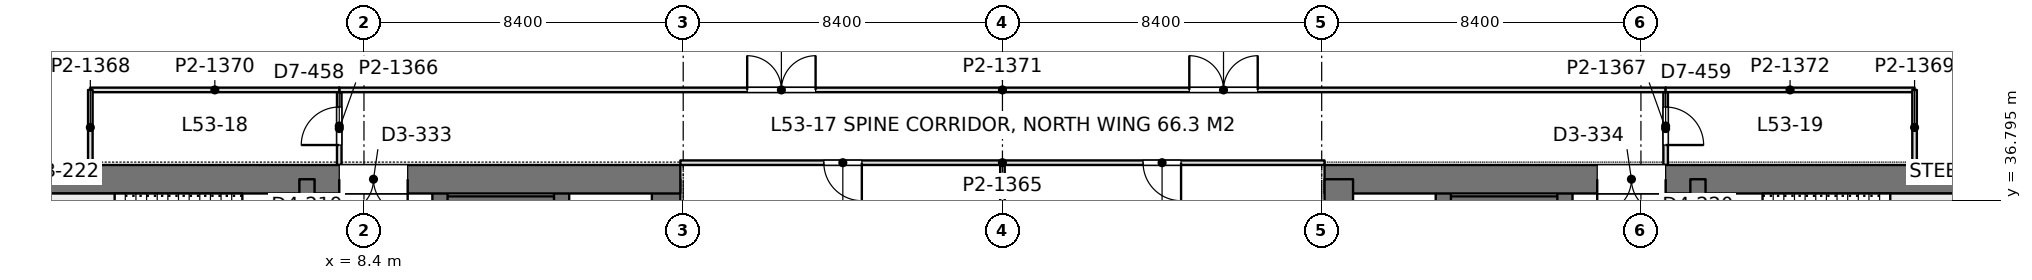
"""IFC4 building model, lengths in metres.
Left out: names, types, materials, properties, quantities, classifications, styles, units other than length and angle.
Written with IfcOpenShell. Run it as: python <this file> out.ifc"""

import sys

from ifc_helpers import new_model, si_unit, direction, frame, frame_2d, origin, place, context, subcontext, project, spatial, rectangle, extrude, element, fill, save


model = new_model("IFC4")
c1 = context("Model", 3, precision=1e-05, world=origin(), true_north=direction((0.0, 1.0)))
c2 = subcontext(c1, "Body", "Model", "MODEL_VIEW")
j1 = project(units=[si_unit("LENGTHUNIT", "METRE"), si_unit("PLANEANGLEUNIT", "RADIAN")], contexts=[c1])
p1 = place(None, origin())
s1 = spatial("IfcSite", under=j1, at=p1, CompositionType="ELEMENT")
p2 = place(p1, origin())
s2 = spatial("IfcBuilding", under=s1, at=p2, CompositionType="ELEMENT")
p3 = place(p2, frame((0.0, 0.0, 232.2)))
s3 = spatial("IfcBuildingStorey", under=s2, at=p3, CompositionType="ELEMENT", Elevation=232.2)
p4 = place(p3, frame((-1.125, 37.35, 0.0), z_axis=(0.0, 0.0, 1.0), x_axis=(1.0, 0.0, 0.0)))
e1 = element("IfcWall", 1, at=p4, inside=s3, PredefinedType="SHEAR", context=c2, shape_type="SweptSolid", body=[
    extrude(rectangle(XDim=17.85, YDim=0.75, at=frame_2d((8.925, 0.0))), origin(), (0.0, 0.0, 1.0), 4.2),
])
p5 = place(p4, frame((8.875, 0.0, 0.0)))
e2 = element("IfcOpeningElement", 2, at=p5, cuts=e1, PredefinedType="OPENING", context=c2, shape_type="SweptSolid", body=[
    extrude(rectangle(XDim=1.8, YDim=2.4, at=frame_2d((0.9, 1.2))), frame((0.0, 0.385, 0.0), z_axis=(0.0, -1.0, 0.0), x_axis=(1.0, 0.0, 0.0)), (0.0, 0.0, 1.0), 0.77),
])
p6 = place(p3, frame((16.35, 27.8, 0.0), z_axis=(0.0, 0.0, 1.0), x_axis=(0.0, 1.0, 0.0)))
e3 = element("IfcWall", 3, at=p6, inside=s3, PredefinedType="SHEAR", context=c2, shape_type="SweptSolid", body=[
    extrude(rectangle(XDim=9.55, YDim=0.75, at=frame_2d((4.775, 0.0))), origin(), (0.0, 0.0, 1.0), 4.2),
])
p7 = place(p3, frame((6.9, 13.05, 0.0), z_axis=(0.0, 0.0, 1.0), x_axis=(0.0, 1.0, 0.0)))
e4 = element("IfcWall", 4, at=p7, inside=s3, PredefinedType="SHEAR", context=c2, shape_type="SweptSolid", body=[
    extrude(rectangle(XDim=24.3, YDim=0.4, at=frame_2d((12.15, 0.0))), origin(), (0.0, 0.0, 1.0), 4.2),
])
p8 = place(p7, frame((1.3, 0.0, 0.0)))
e5 = element("IfcOpeningElement", 5, at=p8, cuts=e4, PredefinedType="OPENING", context=c2, shape_type="SweptSolid", body=[
    extrude(rectangle(XDim=1.0, YDim=2.2, at=frame_2d((0.5, 1.1))), frame((0.0, 0.21, 0.0), z_axis=(0.0, -1.0, 0.0), x_axis=(1.0, 0.0, 0.0)), (0.0, 0.0, 1.0), 0.42),
])
p9 = place(p7, frame((22.0, 0.0, 0.0)))
e6 = element("IfcOpeningElement", 6, at=p9, cuts=e4, PredefinedType="OPENING", context=c2, shape_type="SweptSolid", body=[
    extrude(rectangle(XDim=1.0, YDim=2.2, at=frame_2d((0.5, 1.1))), frame((0.0, 0.21, 0.0), z_axis=(0.0, -1.0, 0.0), x_axis=(1.0, 0.0, 0.0)), (0.0, 0.0, 1.0), 0.42),
])
p10 = place(p7, frame((5.55, 0.0, 0.0)))
e7 = element("IfcOpeningElement", 7, at=p10, cuts=e4, PredefinedType="OPENING", context=c2, shape_type="SweptSolid", body=[
    extrude(rectangle(XDim=1.0, YDim=2.2, at=frame_2d((0.5, 1.1))), frame((0.0, 0.21, 0.0), z_axis=(0.0, -1.0, 0.0), x_axis=(1.0, 0.0, 0.0)), (0.0, 0.0, 1.0), 0.42),
])
p11 = place(p7, frame((9.55, 0.0, 0.0)))
e8 = element("IfcOpeningElement", 8, at=p11, cuts=e4, PredefinedType="OPENING", context=c2, shape_type="SweptSolid", body=[
    extrude(rectangle(XDim=1.0, YDim=2.2, at=frame_2d((0.5, 1.1))), frame((0.0, 0.21, 0.0), z_axis=(0.0, -1.0, 0.0), x_axis=(1.0, 0.0, 0.0)), (0.0, 0.0, 1.0), 0.42),
])
p12 = place(p7, frame((12.8, 0.0, 0.0)))
e9 = element("IfcOpeningElement", 9, at=p12, cuts=e4, PredefinedType="OPENING", context=c2, shape_type="SweptSolid", body=[
    extrude(rectangle(XDim=1.1, YDim=2.2, at=frame_2d((0.55, 1.1))), frame((0.0, 0.21, 0.0), z_axis=(0.0, -1.0, 0.0), x_axis=(1.0, 0.0, 0.0)), (0.0, 0.0, 1.0), 0.42),
])
p13 = place(p7, frame((15.538, 0.0, 0.0)))
e10 = element("IfcOpeningElement", 10, at=p13, cuts=e4, PredefinedType="OPENING", context=c2, shape_type="SweptSolid", body=[
    extrude(rectangle(XDim=1.1, YDim=2.2, at=frame_2d((0.55, 1.1))), frame((0.0, 0.21, 0.0), z_axis=(0.0, -1.0, 0.0), x_axis=(1.0, 0.0, 0.0)), (0.0, 0.0, 1.0), 0.42),
])
p14 = place(p7, frame((18.262, 0.0, 0.0)))
e11 = element("IfcOpeningElement", 11, at=p14, cuts=e4, PredefinedType="OPENING", context=c2, shape_type="SweptSolid", body=[
    extrude(rectangle(XDim=1.1, YDim=2.2, at=frame_2d((0.55, 1.1))), frame((0.0, 0.21, 0.0), z_axis=(0.0, -1.0, 0.0), x_axis=(1.0, 0.0, 0.0)), (0.0, 0.0, 1.0), 0.42),
])
p15 = place(p3, frame((10.4, 13.05, 0.0), z_axis=(0.0, 0.0, 1.0), x_axis=(0.0, 1.0, 0.0)))
e12 = element("IfcWall", 12, at=p15, inside=s3, PredefinedType="SHEAR", context=c2, shape_type="SweptSolid", body=[
    extrude(rectangle(XDim=24.3, YDim=0.4, at=frame_2d((12.15, 0.0))), origin(), (0.0, 0.0, 1.0), 4.2),
])
p16 = place(p15, frame((15.75, 0.0, 0.0)))
e13 = element("IfcOpeningElement", 13, at=p16, cuts=e12, PredefinedType="OPENING", context=c2, shape_type="SweptSolid", body=[
    extrude(rectangle(XDim=1.1, YDim=2.2, at=frame_2d((0.55, 1.1))), frame((0.0, 0.21, 0.0), z_axis=(0.0, -1.0, 0.0), x_axis=(1.0, 0.0, 0.0)), (0.0, 0.0, 1.0), 0.42),
])
p17 = place(p15, frame((18.6, 0.0, 0.0)))
e14 = element("IfcOpeningElement", 14, at=p17, cuts=e12, PredefinedType="OPENING", context=c2, shape_type="SweptSolid", body=[
    extrude(rectangle(XDim=1.1, YDim=2.2, at=frame_2d((0.55, 1.1))), frame((0.0, 0.21, 0.0), z_axis=(0.0, -1.0, 0.0), x_axis=(1.0, 0.0, 0.0)), (0.0, 0.0, 1.0), 0.42),
])
p18 = place(p15, frame((21.45, 0.0, 0.0)))
e15 = element("IfcOpeningElement", 15, at=p18, cuts=e12, PredefinedType="OPENING", context=c2, shape_type="SweptSolid", body=[
    extrude(rectangle(XDim=1.1, YDim=2.2, at=frame_2d((0.55, 1.1))), frame((0.0, 0.21, 0.0), z_axis=(0.0, -1.0, 0.0), x_axis=(1.0, 0.0, 0.0)), (0.0, 0.0, 1.0), 0.42),
])
p19 = place(p15, frame((8.65, 0.0, 0.0)))
e16 = element("IfcOpeningElement", 16, at=p19, cuts=e12, PredefinedType="OPENING", context=c2, shape_type="SweptSolid", body=[
    extrude(rectangle(XDim=1.8, YDim=2.4, at=frame_2d((0.9, 1.2))), frame((0.0, 0.21, 0.0), z_axis=(0.0, -1.0, 0.0), x_axis=(1.0, 0.0, 0.0)), (0.0, 0.0, 1.0), 0.42),
])
p20 = place(p3, frame((13.6, 27.925, 0.0), z_axis=(0.0, 0.0, 1.0), x_axis=(0.0, 1.0, 0.0)))
e17 = element("IfcWall", 17, at=p20, inside=s3, PredefinedType="SHEAR", context=c2, shape_type="SweptSolid", body=[
    extrude(rectangle(XDim=9.425, YDim=0.4, at=frame_2d((4.712, 0.0))), origin(), (0.0, 0.0, 1.0), 4.2),
])
p21 = place(p3, frame((10.4, 36.625, 0.0), z_axis=(0.0, 0.0, 1.0), x_axis=(1.0, 0.0, 0.0)))
e18 = element("IfcWall", 18, at=p21, inside=s3, PredefinedType="SHEAR", context=c2, shape_type="SweptSolid", body=[
    extrude(rectangle(XDim=3.2, YDim=0.55, at=frame_2d((1.6, 0.0))), origin(), (0.0, 0.0, 1.0), 4.2),
])
p22 = place(p3, frame((33.675, 37.35, 0.0), z_axis=(0.0, 0.0, 1.0), x_axis=(1.0, 0.0, 0.0)))
e19 = element("IfcWall", 19, at=p22, inside=s3, PredefinedType="SHEAR", context=c2, shape_type="SweptSolid", body=[
    extrude(rectangle(XDim=17.85, YDim=0.75, at=frame_2d((8.925, 0.0))), origin(), (0.0, 0.0, 1.0), 4.2),
])
p23 = place(p22, frame((7.175, 0.0, 0.0)))
e20 = element("IfcOpeningElement", 20, at=p23, cuts=e19, PredefinedType="OPENING", context=c2, shape_type="SweptSolid", body=[
    extrude(rectangle(XDim=1.8, YDim=2.4, at=frame_2d((0.9, 1.2))), frame((0.0, 0.385, 0.0), z_axis=(0.0, -1.0, 0.0), x_axis=(1.0, 0.0, 0.0)), (0.0, 0.0, 1.0), 0.77),
])
p24 = place(p3, frame((34.05, 27.8, 0.0), z_axis=(0.0, 0.0, 1.0), x_axis=(0.0, 1.0, 0.0)))
e21 = element("IfcWall", 21, at=p24, inside=s3, PredefinedType="SHEAR", context=c2, shape_type="SweptSolid", body=[
    extrude(rectangle(XDim=9.55, YDim=0.75, at=frame_2d((4.775, 0.0))), origin(), (0.0, 0.0, 1.0), 4.2),
])
p25 = place(p3, frame((43.5, 13.05, 0.0), z_axis=(0.0, 0.0, 1.0), x_axis=(0.0, 1.0, 0.0)))
e22 = element("IfcWall", 22, at=p25, inside=s3, PredefinedType="SHEAR", context=c2, shape_type="SweptSolid", body=[
    extrude(rectangle(XDim=24.3, YDim=0.4, at=frame_2d((12.15, 0.0))), origin(), (0.0, 0.0, 1.0), 4.2),
])
p26 = place(p25, frame((1.3, 0.0, 0.0)))
e23 = element("IfcOpeningElement", 23, at=p26, cuts=e22, PredefinedType="OPENING", context=c2, shape_type="SweptSolid", body=[
    extrude(rectangle(XDim=1.0, YDim=2.2, at=frame_2d((0.5, 1.1))), frame((0.0, 0.21, 0.0), z_axis=(0.0, -1.0, 0.0), x_axis=(1.0, 0.0, 0.0)), (0.0, 0.0, 1.0), 0.42),
])
p27 = place(p25, frame((22.0, 0.0, 0.0)))
e24 = element("IfcOpeningElement", 24, at=p27, cuts=e22, PredefinedType="OPENING", context=c2, shape_type="SweptSolid", body=[
    extrude(rectangle(XDim=1.0, YDim=2.2, at=frame_2d((0.5, 1.1))), frame((0.0, 0.21, 0.0), z_axis=(0.0, -1.0, 0.0), x_axis=(1.0, 0.0, 0.0)), (0.0, 0.0, 1.0), 0.42),
])
p28 = place(p25, frame((5.55, 0.0, 0.0)))
e25 = element("IfcOpeningElement", 25, at=p28, cuts=e22, PredefinedType="OPENING", context=c2, shape_type="SweptSolid", body=[
    extrude(rectangle(XDim=1.0, YDim=2.2, at=frame_2d((0.5, 1.1))), frame((0.0, 0.21, 0.0), z_axis=(0.0, -1.0, 0.0), x_axis=(1.0, 0.0, 0.0)), (0.0, 0.0, 1.0), 0.42),
])
p29 = place(p25, frame((9.55, 0.0, 0.0)))
e26 = element("IfcOpeningElement", 26, at=p29, cuts=e22, PredefinedType="OPENING", context=c2, shape_type="SweptSolid", body=[
    extrude(rectangle(XDim=1.0, YDim=2.2, at=frame_2d((0.5, 1.1))), frame((0.0, 0.21, 0.0), z_axis=(0.0, -1.0, 0.0), x_axis=(1.0, 0.0, 0.0)), (0.0, 0.0, 1.0), 0.42),
])
p30 = place(p25, frame((12.8, 0.0, 0.0)))
e27 = element("IfcOpeningElement", 27, at=p30, cuts=e22, PredefinedType="OPENING", context=c2, shape_type="SweptSolid", body=[
    extrude(rectangle(XDim=1.1, YDim=2.2, at=frame_2d((0.55, 1.1))), frame((0.0, 0.21, 0.0), z_axis=(0.0, -1.0, 0.0), x_axis=(1.0, 0.0, 0.0)), (0.0, 0.0, 1.0), 0.42),
])
p31 = place(p25, frame((15.538, 0.0, 0.0)))
e28 = element("IfcOpeningElement", 28, at=p31, cuts=e22, PredefinedType="OPENING", context=c2, shape_type="SweptSolid", body=[
    extrude(rectangle(XDim=1.1, YDim=2.2, at=frame_2d((0.55, 1.1))), frame((0.0, 0.21, 0.0), z_axis=(0.0, -1.0, 0.0), x_axis=(1.0, 0.0, 0.0)), (0.0, 0.0, 1.0), 0.42),
])
p32 = place(p25, frame((18.262, 0.0, 0.0)))
e29 = element("IfcOpeningElement", 29, at=p32, cuts=e22, PredefinedType="OPENING", context=c2, shape_type="SweptSolid", body=[
    extrude(rectangle(XDim=1.1, YDim=2.2, at=frame_2d((0.55, 1.1))), frame((0.0, 0.21, 0.0), z_axis=(0.0, -1.0, 0.0), x_axis=(1.0, 0.0, 0.0)), (0.0, 0.0, 1.0), 0.42),
])
p33 = place(p3, frame((40.0, 13.05, 0.0), z_axis=(0.0, 0.0, 1.0), x_axis=(0.0, 1.0, 0.0)))
e30 = element("IfcWall", 30, at=p33, inside=s3, PredefinedType="SHEAR", context=c2, shape_type="SweptSolid", body=[
    extrude(rectangle(XDim=24.3, YDim=0.4, at=frame_2d((12.15, 0.0))), origin(), (0.0, 0.0, 1.0), 4.2),
])
p34 = place(p33, frame((15.75, 0.0, 0.0)))
e31 = element("IfcOpeningElement", 31, at=p34, cuts=e30, PredefinedType="OPENING", context=c2, shape_type="SweptSolid", body=[
    extrude(rectangle(XDim=1.1, YDim=2.2, at=frame_2d((0.55, 1.1))), frame((0.0, 0.21, 0.0), z_axis=(0.0, -1.0, 0.0), x_axis=(1.0, 0.0, 0.0)), (0.0, 0.0, 1.0), 0.42),
])
p35 = place(p33, frame((18.6, 0.0, 0.0)))
e32 = element("IfcOpeningElement", 32, at=p35, cuts=e30, PredefinedType="OPENING", context=c2, shape_type="SweptSolid", body=[
    extrude(rectangle(XDim=1.1, YDim=2.2, at=frame_2d((0.55, 1.1))), frame((0.0, 0.21, 0.0), z_axis=(0.0, -1.0, 0.0), x_axis=(1.0, 0.0, 0.0)), (0.0, 0.0, 1.0), 0.42),
])
p36 = place(p33, frame((21.45, 0.0, 0.0)))
e33 = element("IfcOpeningElement", 33, at=p36, cuts=e30, PredefinedType="OPENING", context=c2, shape_type="SweptSolid", body=[
    extrude(rectangle(XDim=1.1, YDim=2.2, at=frame_2d((0.55, 1.1))), frame((0.0, 0.21, 0.0), z_axis=(0.0, -1.0, 0.0), x_axis=(1.0, 0.0, 0.0)), (0.0, 0.0, 1.0), 0.42),
])
p37 = place(p33, frame((8.65, 0.0, 0.0)))
e34 = element("IfcOpeningElement", 34, at=p37, cuts=e30, PredefinedType="OPENING", context=c2, shape_type="SweptSolid", body=[
    extrude(rectangle(XDim=1.8, YDim=2.4, at=frame_2d((0.9, 1.2))), frame((0.0, 0.21, 0.0), z_axis=(0.0, -1.0, 0.0), x_axis=(1.0, 0.0, 0.0)), (0.0, 0.0, 1.0), 0.42),
])
p38 = place(p3, frame((36.8, 27.925, 0.0), z_axis=(0.0, 0.0, 1.0), x_axis=(0.0, 1.0, 0.0)))
e35 = element("IfcWall", 35, at=p38, inside=s3, PredefinedType="SHEAR", context=c2, shape_type="SweptSolid", body=[
    extrude(rectangle(XDim=9.425, YDim=0.4, at=frame_2d((4.712, 0.0))), origin(), (0.0, 0.0, 1.0), 4.2),
])
p39 = place(p3, frame((40.0, 36.625, 0.0), z_axis=(0.0, 0.0, 1.0), x_axis=(-1.0, 0.0, 0.0)))
e36 = element("IfcWall", 36, at=p39, inside=s3, PredefinedType="SHEAR", context=c2, shape_type="SweptSolid", body=[
    extrude(rectangle(XDim=3.2, YDim=0.55, at=frame_2d((1.6, 0.0))), origin(), (0.0, 0.0, 1.0), 4.2),
])
p40 = place(p3, frame((7.748, 39.7, 0.0), z_axis=(0.0, 0.0, 1.0), x_axis=(1.0, 0.0, 0.0)))
e37 = element("IfcWall", 37, at=p40, inside=s3, PredefinedType="PARTITIONING", context=c2, shape_type="SweptSolid", body=[
    extrude(rectangle(XDim=34.904, YDim=0.12, at=frame_2d((17.452, 0.0))), origin(), (0.0, 0.0, 1.0), 3.55),
])
p41 = place(p40, frame((10.735, 0.0, 0.0)))
e38 = element("IfcOpeningElement", 38, at=p41, cuts=e37, PredefinedType="OPENING", context=c2, shape_type="SweptSolid", body=[
    extrude(rectangle(XDim=1.8, YDim=2.2, at=frame_2d((0.9, 1.1))), frame((0.0, 0.07, 0.0), z_axis=(0.0, -1.0, 0.0), x_axis=(1.0, 0.0, 0.0)), (0.0, 0.0, 1.0), 0.14),
])
p42 = place(p40, frame((22.369, 0.0, 0.0)))
e39 = element("IfcOpeningElement", 39, at=p42, cuts=e37, PredefinedType="OPENING", context=c2, shape_type="SweptSolid", body=[
    extrude(rectangle(XDim=1.8, YDim=2.2, at=frame_2d((0.9, 1.1))), frame((0.0, 0.07, 0.0), z_axis=(0.0, -1.0, 0.0), x_axis=(1.0, 0.0, 0.0)), (0.0, 0.0, 1.0), 0.14),
])
p43 = place(p3, frame((7.75, 37.724, 0.0), z_axis=(0.0, 0.0, 1.0), x_axis=(0.0, 1.0, 0.0)))
e40 = element("IfcWall", 40, at=p43, inside=s3, PredefinedType="PARTITIONING", context=c2, shape_type="SweptSolid", body=[
    extrude(rectangle(XDim=1.918, YDim=0.12, at=frame_2d((0.959, 0.0))), origin(), (0.0, 0.0, 1.0), 4.05),
])
p44 = place(p43, frame((0.526, 0.0, 0.0)))
e41 = element("IfcOpeningElement", 41, at=p44, cuts=e40, PredefinedType="OPENING", context=c2, shape_type="SweptSolid", body=[
    extrude(rectangle(XDim=1.0, YDim=2.4, at=frame_2d((0.5, 1.2))), frame((0.0, 0.07, 0.0), z_axis=(0.0, -1.0, 0.0), x_axis=(1.0, 0.0, 0.0)), (0.0, 0.0, 1.0), 0.14),
])
p45 = place(p3, frame((42.65, 37.724, 0.0), z_axis=(0.0, 0.0, 1.0), x_axis=(0.0, 1.0, 0.0)))
e42 = element("IfcWall", 42, at=p45, inside=s3, PredefinedType="PARTITIONING", context=c2, shape_type="SweptSolid", body=[
    extrude(rectangle(XDim=1.918, YDim=0.12, at=frame_2d((0.959, 0.0))), origin(), (0.0, 0.0, 1.0), 4.05),
])
p46 = place(p45, frame((0.526, 0.0, 0.0)))
e43 = element("IfcOpeningElement", 43, at=p46, cuts=e42, PredefinedType="OPENING", context=c2, shape_type="SweptSolid", body=[
    extrude(rectangle(XDim=1.0, YDim=2.4, at=frame_2d((0.5, 1.2))), frame((0.0, 0.07, 0.0), z_axis=(0.0, -1.0, 0.0), x_axis=(1.0, 0.0, 0.0)), (0.0, 0.0, 1.0), 0.14),
])
p47 = place(p3, frame((1.2, 39.7, 0.0), z_axis=(0.0, 0.0, 1.0), x_axis=(1.0, 0.0, 0.0)))
e44 = element("IfcWall", 44, at=p47, inside=s3, PredefinedType="PARTITIONING", context=c2, shape_type="SweptSolid", body=[
    extrude(rectangle(XDim=6.552, YDim=0.12, at=frame_2d((3.276, 0.0))), origin(), (0.0, 0.0, 1.0), 3.69),
])
p48 = place(p3, frame((1.2, 37.724, 0.0), z_axis=(0.0, 0.0, 1.0), x_axis=(0.0, 1.0, 0.0)))
e45 = element("IfcWall", 45, at=p48, inside=s3, PredefinedType="PARTITIONING", context=c2, shape_type="SweptSolid", body=[
    extrude(rectangle(XDim=1.976, YDim=0.12, at=frame_2d((0.988, 0.0))), origin(), (0.0, 0.0, 1.0), 4.05),
])
p49 = place(p3, frame((42.648, 39.7, 0.0), z_axis=(0.0, 0.0, 1.0), x_axis=(1.0, 0.0, 0.0)))
e46 = element("IfcWall", 46, at=p49, inside=s3, PredefinedType="PARTITIONING", context=c2, shape_type="SweptSolid", body=[
    extrude(rectangle(XDim=6.552, YDim=0.12, at=frame_2d((3.276, 0.0))), origin(), (0.0, 0.0, 1.0), 3.69),
])
p50 = place(p3, frame((49.2, 37.724, 0.0), z_axis=(0.0, 0.0, 1.0), x_axis=(0.0, 1.0, 0.0)))
e47 = element("IfcWall", 47, at=p50, inside=s3, PredefinedType="PARTITIONING", context=c2, shape_type="SweptSolid", body=[
    extrude(rectangle(XDim=1.976, YDim=0.12, at=frame_2d((0.988, 0.0))), origin(), (0.0, 0.0, 1.0), 4.05),
])
p51 = place(p3, frame((25.2, 34.149, 0.0), z_axis=(0.0, 0.0, 1.0), x_axis=(0.0, 1.0, 0.0)))
e48 = element("IfcWall", 48, at=p51, inside=s3, PredefinedType="PARTITIONING", context=c2, shape_type="SweptSolid", body=[
    extrude(rectangle(XDim=3.593, YDim=0.12, at=frame_2d((1.796, 0.0))), origin(), (0.0, 0.0, 1.0), 3.55),
])
p52 = place(p3, frame((16.725, 37.785, 0.0), z_axis=(0.0, 0.0, 1.0), x_axis=(1.0, 0.0, 0.0)))
e49 = element("IfcWall", 49, at=p52, inside=s3, PredefinedType="PARTITIONING", context=c2, shape_type="SweptSolid", body=[
    extrude(rectangle(XDim=16.95, YDim=0.12, at=frame_2d((8.475, 0.0))), origin(), (0.0, 0.0, 1.0), 3.55),
])
p53 = place(p52, frame((3.775, 0.0, 0.0)))
e50 = element("IfcOpeningElement", 50, at=p53, cuts=e49, PredefinedType="OPENING", context=c2, shape_type="SweptSolid", body=[
    extrude(rectangle(XDim=1.0, YDim=2.4, at=frame_2d((0.5, 1.2))), frame((0.0, 0.07, 0.0), z_axis=(0.0, -1.0, 0.0), x_axis=(1.0, 0.0, 0.0)), (0.0, 0.0, 1.0), 0.14),
])
p54 = place(p52, frame((12.175, 0.0, 0.0)))
e51 = element("IfcOpeningElement", 51, at=p54, cuts=e49, PredefinedType="OPENING", context=c2, shape_type="SweptSolid", body=[
    extrude(rectangle(XDim=1.0, YDim=2.4, at=frame_2d((0.5, 1.2))), frame((0.0, 0.07, 0.0), z_axis=(0.0, -1.0, 0.0), x_axis=(1.0, 0.0, 0.0)), (0.0, 0.0, 1.0), 0.14),
])
p55 = place(p5, frame((1.8, 0.0, 0.0), z_axis=(0.0, 0.0, 1.0), x_axis=(-1.0, 0.0, 0.0)))
e52 = element("IfcDoor", 52, at=p55, inside=s3, OperationType="DOUBLE_DOOR_SINGLE_SWING", PredefinedType="DOOR", context=c2, shape_type="SweptSolid", body=[
    extrude(rectangle(XDim=1.8, YDim=2.4, at=frame_2d((0.9, 1.2))), frame((0.0, 0.025, 0.0), z_axis=(0.0, -1.0, 0.0), x_axis=(1.0, 0.0, 0.0)), (0.0, 0.0, 1.0), 0.05),
])
fill(e2, e52)
p56 = place(p23, frame((1.8, 0.0, 0.0), z_axis=(0.0, 0.0, 1.0), x_axis=(-1.0, 0.0, 0.0)))
e53 = element("IfcDoor", 53, at=p56, inside=s3, OperationType="DOUBLE_DOOR_SINGLE_SWING", PredefinedType="DOOR", context=c2, shape_type="SweptSolid", body=[
    extrude(rectangle(XDim=1.8, YDim=2.4, at=frame_2d((0.9, 1.2))), frame((0.0, 0.025, 0.0), z_axis=(0.0, -1.0, 0.0), x_axis=(1.0, 0.0, 0.0)), (0.0, 0.0, 1.0), 0.05),
])
fill(e20, e53)
p57 = place(p41, origin())
e54 = element("IfcDoor", 54, at=p57, inside=s3, OperationType="DOUBLE_DOOR_SINGLE_SWING", PredefinedType="DOOR", context=c2, shape_type="SweptSolid", body=[
    extrude(rectangle(XDim=1.8, YDim=2.2, at=frame_2d((0.9, 1.1))), frame((0.0, 0.025, 0.0), z_axis=(0.0, -1.0, 0.0), x_axis=(1.0, 0.0, 0.0)), (0.0, 0.0, 1.0), 0.05),
])
fill(e38, e54)
p58 = place(p42, origin())
e55 = element("IfcDoor", 55, at=p58, inside=s3, OperationType="DOUBLE_DOOR_SINGLE_SWING", PredefinedType="DOOR", context=c2, shape_type="SweptSolid", body=[
    extrude(rectangle(XDim=1.8, YDim=2.2, at=frame_2d((0.9, 1.1))), frame((0.0, 0.025, 0.0), z_axis=(0.0, -1.0, 0.0), x_axis=(1.0, 0.0, 0.0)), (0.0, 0.0, 1.0), 0.05),
])
fill(e39, e55)
p59 = place(p44, origin())
e56 = element("IfcDoor", 56, at=p59, inside=s3, OperationType="SINGLE_SWING_LEFT", PredefinedType="DOOR", context=c2, shape_type="SweptSolid", body=[
    extrude(rectangle(XDim=1.0, YDim=2.4, at=frame_2d((0.5, 1.2))), frame((0.0, 0.025, 0.0), z_axis=(0.0, -1.0, 0.0), x_axis=(1.0, 0.0, 0.0)), (0.0, 0.0, 1.0), 0.05),
])
fill(e41, e56)
p60 = place(p46, frame((1.0, 0.0, 0.0), z_axis=(0.0, 0.0, 1.0), x_axis=(-1.0, 0.0, 0.0)))
e57 = element("IfcDoor", 57, at=p60, inside=s3, OperationType="SINGLE_SWING_RIGHT", PredefinedType="DOOR", context=c2, shape_type="SweptSolid", body=[
    extrude(rectangle(XDim=1.0, YDim=2.4, at=frame_2d((0.5, 1.2))), frame((0.0, 0.025, 0.0), z_axis=(0.0, -1.0, 0.0), x_axis=(1.0, 0.0, 0.0)), (0.0, 0.0, 1.0), 0.05),
])
fill(e43, e57)
p61 = place(p53, frame((1.0, 0.0, 0.0), z_axis=(0.0, 0.0, 1.0), x_axis=(-1.0, 0.0, 0.0)))
e58 = element("IfcDoor", 58, at=p61, inside=s3, OperationType="SINGLE_SWING_LEFT", PredefinedType="DOOR", context=c2, shape_type="SweptSolid", body=[
    extrude(rectangle(XDim=1.0, YDim=2.4, at=frame_2d((0.5, 1.2))), frame((0.0, 0.025, 0.0), z_axis=(0.0, -1.0, 0.0), x_axis=(1.0, 0.0, 0.0)), (0.0, 0.0, 1.0), 0.05),
])
fill(e50, e58)
p62 = place(p54, frame((1.0, 0.0, 0.0), z_axis=(0.0, 0.0, 1.0), x_axis=(-1.0, 0.0, 0.0)))
e59 = element("IfcDoor", 59, at=p62, inside=s3, OperationType="SINGLE_SWING_LEFT", PredefinedType="DOOR", context=c2, shape_type="SweptSolid", body=[
    extrude(rectangle(XDim=1.0, YDim=2.4, at=frame_2d((0.5, 1.2))), frame((0.0, 0.025, 0.0), z_axis=(0.0, -1.0, 0.0), x_axis=(1.0, 0.0, 0.0)), (0.0, 0.0, 1.0), 0.05),
])
fill(e51, e59)
save(model, sys.argv[1])
